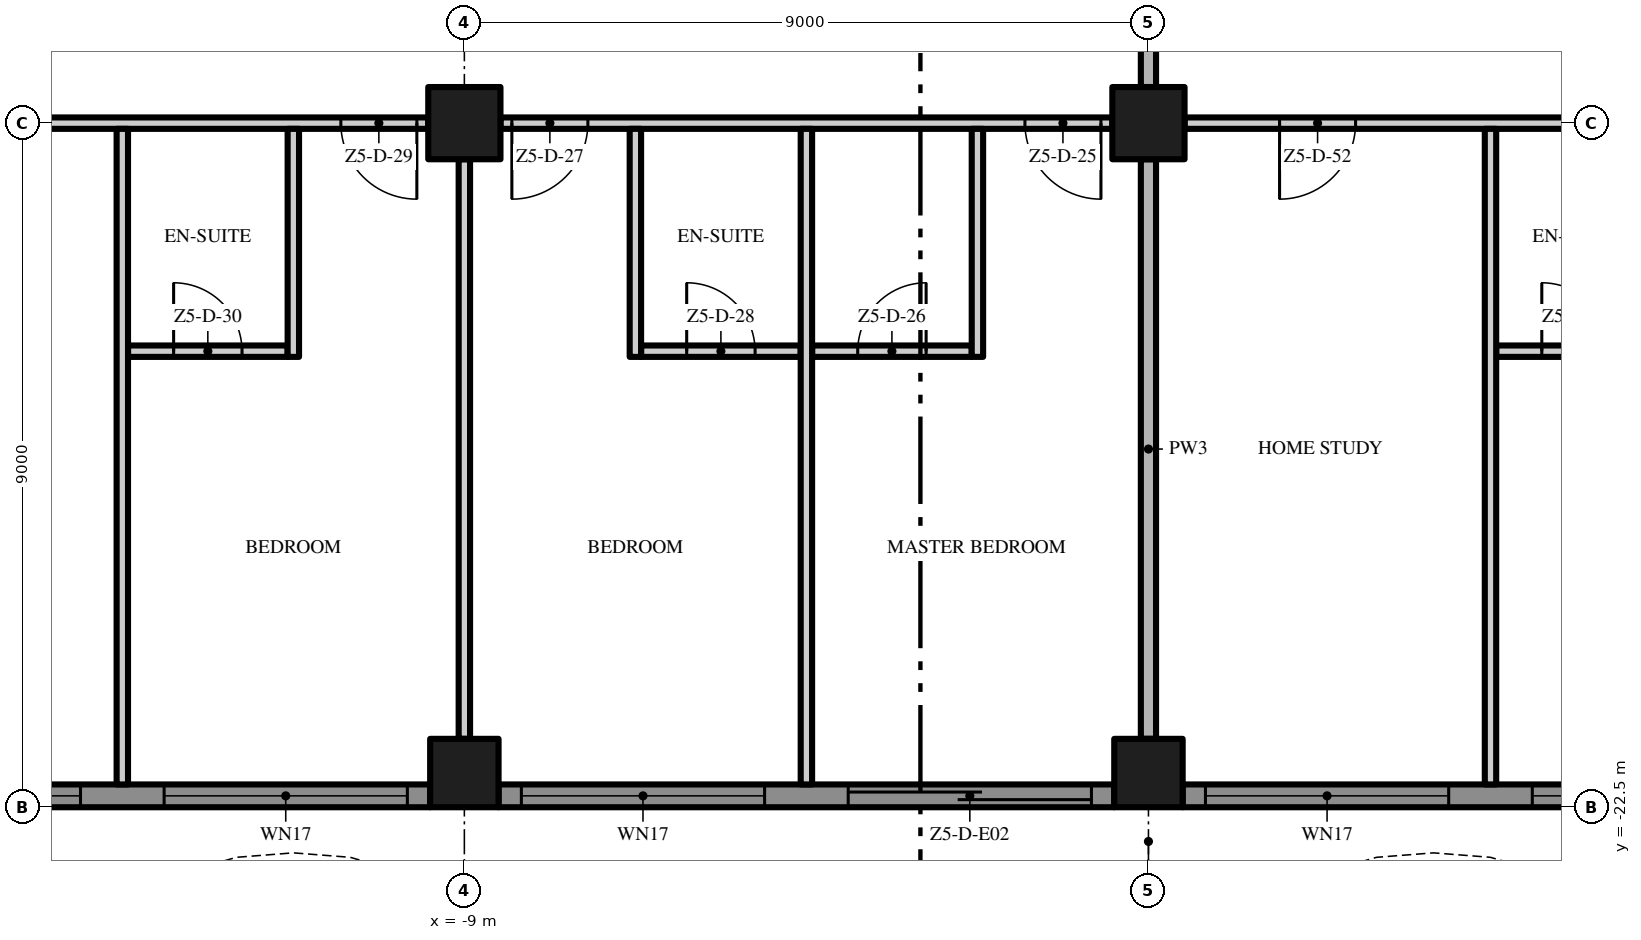
"""IFC4 building model, lengths in metres.
Left out: names, types, materials, properties, quantities, classifications, styles, units other than length and angle.
Written with IfcOpenShell. Run it as: python <this file> out.ifc"""

import sys

from ifc_helpers import new_model, si_unit, direction, frame, frame_2d, origin, origin_2d, place, context, subcontext, project, spatial, polyline, rectangle, outline, extrude, element, fill, save


model = new_model("IFC4")
c1 = context("Model", 3, precision=1e-05, world=origin(), true_north=direction((0.0, 1.0)))
c2 = subcontext(c1, "Body", "Model", "MODEL_VIEW")
j1 = project(units=[si_unit("LENGTHUNIT", "METRE"), si_unit("PLANEANGLEUNIT", "RADIAN")], contexts=[c1])
p1 = place(None, origin())
s1 = spatial("IfcSite", under=j1, at=p1, CompositionType="ELEMENT")
p2 = place(p1, origin())
s2 = spatial("IfcBuilding", under=s1, at=p2, CompositionType="ELEMENT")
p3 = place(p2, frame((0.0, 0.0, 273.0)))
s3 = spatial("IfcBuildingStorey", under=s2, at=p3, CompositionType="ELEMENT", Elevation=273.0)
p4 = place(p3, frame((-9.0, -13.5, 0.0), z_axis=(0.0, 0.0, 1.0), x_axis=(1.0, 0.0, 0.0)))
e1 = element("IfcColumn", 1, at=p4, inside=s3, PredefinedType="COLUMN", context=c2, shape_type="SweptSolid", body=[
    extrude(rectangle(XDim=0.95, YDim=0.95, at=origin_2d()), origin(), (0.0, 0.0, 1.0), 3.5),
])
p5 = place(p3, frame((-9.0, -22.05, 0.0), z_axis=(0.0, 0.0, 1.0), x_axis=(1.0, 0.0, 0.0)))
e2 = element("IfcColumn", 2, at=p5, inside=s3, PredefinedType="COLUMN", context=c2, shape_type="SweptSolid", body=[
    extrude(rectangle(XDim=0.9, YDim=0.9, at=origin_2d()), origin(), (0.0, 0.0, 1.0), 3.5),
])
p6 = place(p3, frame((0.0, -13.5, 0.0), z_axis=(0.0, 0.0, 1.0), x_axis=(1.0, 0.0, 0.0)))
e3 = element("IfcColumn", 3, at=p6, inside=s3, PredefinedType="COLUMN", context=c2, shape_type="SweptSolid", body=[
    extrude(rectangle(XDim=0.95, YDim=0.95, at=origin_2d()), origin(), (0.0, 0.0, 1.0), 3.5),
])
p7 = place(p3, frame((0.0, -22.05, 0.0), z_axis=(0.0, 0.0, 1.0), x_axis=(1.0, 0.0, 0.0)))
e4 = element("IfcColumn", 4, at=p7, inside=s3, PredefinedType="COLUMN", context=c2, shape_type="SweptSolid", body=[
    extrude(rectangle(XDim=0.9, YDim=0.9, at=origin_2d()), origin(), (0.0, 0.0, 1.0), 3.5),
])
p8 = place(p3, frame((-9.45, -22.35, 0.0), z_axis=(0.0, 0.0, 1.0), x_axis=(-1.0, 0.0, 0.0)))
e5 = element("IfcWall", 5, at=p8, inside=s3, PredefinedType="SOLIDWALL", context=c2, shape_type="SweptSolid", body=[
    extrude(rectangle(XDim=8.1, YDim=0.3, at=frame_2d((4.05, 0.0))), origin(), (0.0, 0.0, 1.0), 3.5),
])
p9 = place(p8, frame((4.6, 0.0, 0.45)))
e6 = element("IfcOpeningElement", 6, at=p9, cuts=e5, PredefinedType="OPENING", context=c2, shape_type="SweptSolid", body=[
    extrude(rectangle(XDim=3.2, YDim=2.65, at=frame_2d((1.6, 1.325))), frame((0.0, 0.16, 0.0), z_axis=(0.0, -1.0, 0.0), x_axis=(1.0, 0.0, 0.0)), (0.0, 0.0, 1.0), 0.32),
])
p10 = place(p8, frame((0.3, 0.0, 0.45)))
e7 = element("IfcOpeningElement", 7, at=p10, cuts=e5, PredefinedType="OPENING", context=c2, shape_type="SweptSolid", body=[
    extrude(rectangle(XDim=3.2, YDim=2.65, at=frame_2d((1.6, 1.325))), frame((0.0, 0.16, 0.0), z_axis=(0.0, -1.0, 0.0), x_axis=(1.0, 0.0, 0.0)), (0.0, 0.0, 1.0), 0.32),
])
p11 = place(p3, frame((-0.45, -22.35, 0.0), z_axis=(0.0, 0.0, 1.0), x_axis=(-1.0, 0.0, 0.0)))
e8 = element("IfcWall", 8, at=p11, inside=s3, PredefinedType="SOLIDWALL", context=c2, shape_type="SweptSolid", body=[
    extrude(rectangle(XDim=8.1, YDim=0.3, at=frame_2d((4.05, 0.0))), origin(), (0.0, 0.0, 1.0), 3.5),
])
p12 = place(p11, frame((4.6, 0.0, 0.45)))
e9 = element("IfcOpeningElement", 9, at=p12, cuts=e8, PredefinedType="OPENING", context=c2, shape_type="SweptSolid", body=[
    extrude(rectangle(XDim=3.2, YDim=2.65, at=frame_2d((1.6, 1.325))), frame((0.0, 0.16, 0.0), z_axis=(0.0, -1.0, 0.0), x_axis=(1.0, 0.0, 0.0)), (0.0, 0.0, 1.0), 0.32),
])
p13 = place(p11, frame((0.3, 0.0, 0.0)))
e10 = element("IfcOpeningElement", 10, at=p13, cuts=e8, PredefinedType="OPENING", context=c2, shape_type="SweptSolid", body=[
    extrude(rectangle(XDim=3.2, YDim=2.4, at=frame_2d((1.6, 1.2))), frame((0.0, 0.16, 0.0), z_axis=(0.0, -1.0, 0.0), x_axis=(1.0, 0.0, 0.0)), (0.0, 0.0, 1.0), 0.32),
])
p14 = place(p3, frame((8.55, -22.35, 0.0), z_axis=(0.0, 0.0, 1.0), x_axis=(-1.0, 0.0, 0.0)))
e11 = element("IfcWall", 11, at=p14, inside=s3, PredefinedType="SOLIDWALL", context=c2, shape_type="SweptSolid", body=[
    extrude(rectangle(XDim=8.1, YDim=0.3, at=frame_2d((4.05, 0.0))), origin(), (0.0, 0.0, 1.0), 3.5),
])
p15 = place(p14, frame((4.6, 0.0, 0.45)))
e12 = element("IfcOpeningElement", 12, at=p15, cuts=e11, PredefinedType="OPENING", context=c2, shape_type="SweptSolid", body=[
    extrude(rectangle(XDim=3.2, YDim=2.65, at=frame_2d((1.6, 1.325))), frame((0.0, 0.16, 0.0), z_axis=(0.0, -1.0, 0.0), x_axis=(1.0, 0.0, 0.0)), (0.0, 0.0, 1.0), 0.32),
])
p16 = place(p14, frame((0.3, 0.0, 0.45)))
e13 = element("IfcOpeningElement", 13, at=p16, cuts=e11, PredefinedType="OPENING", context=c2, shape_type="SweptSolid", body=[
    extrude(rectangle(XDim=3.2, YDim=2.65, at=frame_2d((1.6, 1.325))), frame((0.0, 0.16, 0.0), z_axis=(0.0, -1.0, 0.0), x_axis=(1.0, 0.0, 0.0)), (0.0, 0.0, 1.0), 0.32),
])
p17 = place(p3, origin())
e14 = element("IfcWall", 14, at=p17, inside=s3, PredefinedType="USERDEFINED", context=c2, shape_type="SweptSolid", body=[
    extrude(outline(polyline([(-22.5, -24.3), (-21.0, -25.005), (-19.5, -25.441), (-18.75, -25.5), (-18.0, -25.441), (-16.5, -25.005), (-15.0, -24.3), (-13.5, -23.595), (-12.0, -23.159), (-11.25, -23.1), (-10.5, -23.159), (-9.0, -23.595), (-7.5, -24.3), (-6.0, -25.005), (-4.5, -25.441), (-3.75, -25.5), (-3.0, -25.441), (-1.5, -25.005), (0.0, -24.3), (1.5, -23.595), (3.0, -23.159), (3.75, -23.1), (4.5, -23.159), (6.0, -23.595), (7.5, -24.3), (9.0, -25.005), (10.5, -25.441), (11.25, -25.5), (12.0, -25.441), (13.5, -25.005), (15.0, -24.3), (16.5, -23.595), (18.0, -23.159), (18.75, -23.1), (19.5, -23.159), (21.0, -23.595), (22.5, -24.3), (22.606, -24.074), (21.089, -23.36), (19.545, -22.911), (18.75, -22.849), (17.955, -22.911), (16.411, -23.36), (14.894, -24.074), (13.411, -24.771), (11.955, -25.194), (11.25, -25.249), (10.545, -25.194), (9.089, -24.771), (7.606, -24.074), (6.089, -23.36), (4.545, -22.911), (3.75, -22.849), (2.955, -22.911), (1.411, -23.36), (-0.106, -24.074), (-1.589, -24.771), (-3.045, -25.194), (-3.75, -25.249), (-4.455, -25.194), (-5.911, -24.771), (-7.394, -24.074), (-8.911, -23.36), (-10.455, -22.911), (-11.25, -22.849), (-12.045, -22.911), (-13.589, -23.36), (-15.106, -24.074), (-16.589, -24.771), (-18.045, -25.194), (-18.75, -25.249), (-19.455, -25.194), (-20.911, -24.771), (-22.394, -24.074), (-22.5, -24.3)])), origin(), (0.0, 0.0, 1.0), 0.9),
])
p18 = place(p3, frame((-13.425, -16.5, 0.0), z_axis=(0.0, 0.0, 1.0), x_axis=(1.0, 0.0, 0.0)))
e15 = element("IfcWall", 15, at=p18, inside=s3, PredefinedType="PARTITIONING", context=c2, shape_type="SweptSolid", body=[
    extrude(rectangle(XDim=2.1, YDim=0.15, at=frame_2d((1.05, 0.0))), origin(), (0.0, 0.0, 1.0), 3.5),
])
p19 = place(p18, frame((0.6, 0.0, 0.0)))
e16 = element("IfcOpeningElement", 16, at=p19, cuts=e15, PredefinedType="OPENING", context=c2, shape_type="SweptSolid", body=[
    extrude(rectangle(XDim=0.9, YDim=2.1, at=frame_2d((0.45, 1.05))), frame((0.0, 0.085, 0.0), z_axis=(0.0, -1.0, 0.0), x_axis=(1.0, 0.0, 0.0)), (0.0, 0.0, 1.0), 0.17),
])
p20 = place(p3, frame((-6.675, -16.5, 0.0), z_axis=(0.0, 0.0, 1.0), x_axis=(1.0, 0.0, 0.0)))
e17 = element("IfcWall", 17, at=p20, inside=s3, PredefinedType="PARTITIONING", context=c2, shape_type="SweptSolid", body=[
    extrude(rectangle(XDim=2.1, YDim=0.15, at=frame_2d((1.05, 0.0))), origin(), (0.0, 0.0, 1.0), 3.5),
])
p21 = place(p20, frame((0.6, 0.0, 0.0)))
e18 = element("IfcOpeningElement", 18, at=p21, cuts=e17, PredefinedType="OPENING", context=c2, shape_type="SweptSolid", body=[
    extrude(rectangle(XDim=0.9, YDim=2.1, at=frame_2d((0.45, 1.05))), frame((0.0, 0.085, 0.0), z_axis=(0.0, -1.0, 0.0), x_axis=(1.0, 0.0, 0.0)), (0.0, 0.0, 1.0), 0.17),
])
p22 = place(p3, frame((-4.425, -16.5, 0.0), z_axis=(0.0, 0.0, 1.0), x_axis=(1.0, 0.0, 0.0)))
e19 = element("IfcWall", 19, at=p22, inside=s3, PredefinedType="PARTITIONING", context=c2, shape_type="SweptSolid", body=[
    extrude(rectangle(XDim=2.1, YDim=0.15, at=frame_2d((1.05, 0.0))), origin(), (0.0, 0.0, 1.0), 3.5),
])
p23 = place(p22, frame((0.6, 0.0, 0.0)))
e20 = element("IfcOpeningElement", 20, at=p23, cuts=e19, PredefinedType="OPENING", context=c2, shape_type="SweptSolid", body=[
    extrude(rectangle(XDim=0.9, YDim=2.1, at=frame_2d((0.45, 1.05))), frame((0.0, 0.085, 0.0), z_axis=(0.0, -1.0, 0.0), x_axis=(1.0, 0.0, 0.0)), (0.0, 0.0, 1.0), 0.17),
])
p24 = place(p3, frame((4.575, -16.5, 0.0), z_axis=(0.0, 0.0, 1.0), x_axis=(1.0, 0.0, 0.0)))
e21 = element("IfcWall", 21, at=p24, inside=s3, PredefinedType="PARTITIONING", context=c2, shape_type="SweptSolid", body=[
    extrude(rectangle(XDim=2.1, YDim=0.15, at=frame_2d((1.05, 0.0))), origin(), (0.0, 0.0, 1.0), 3.5),
])
p25 = place(p24, frame((0.6, 0.0, 0.0)))
e22 = element("IfcOpeningElement", 22, at=p25, cuts=e21, PredefinedType="OPENING", context=c2, shape_type="SweptSolid", body=[
    extrude(rectangle(XDim=0.9, YDim=2.1, at=frame_2d((0.45, 1.05))), frame((0.0, 0.085, 0.0), z_axis=(0.0, -1.0, 0.0), x_axis=(1.0, 0.0, 0.0)), (0.0, 0.0, 1.0), 0.17),
])
p26 = place(p3, frame((-9.475, -13.5, 0.0), z_axis=(0.0, 0.0, 1.0), x_axis=(-1.0, 0.0, 0.0)))
e23 = element("IfcWall", 23, at=p26, inside=s3, PredefinedType="PARTITIONING", context=c2, shape_type="SweptSolid", body=[
    extrude(rectangle(XDim=8.05, YDim=0.15, at=frame_2d((4.025, 0.0))), origin(), (0.0, 0.0, 1.0), 3.5),
])
p27 = place(p26, frame((0.15, 0.0, 0.0)))
e24 = element("IfcOpeningElement", 24, at=p27, cuts=e23, PredefinedType="OPENING", context=c2, shape_type="SweptSolid", body=[
    extrude(rectangle(XDim=1.0, YDim=2.4, at=frame_2d((0.5, 1.2))), frame((0.0, 0.085, 0.0), z_axis=(0.0, -1.0, 0.0), x_axis=(1.0, 0.0, 0.0)), (0.0, 0.0, 1.0), 0.17),
])
p28 = place(p26, frame((5.8, 0.0, 0.0)))
e25 = element("IfcOpeningElement", 25, at=p28, cuts=e23, PredefinedType="OPENING", context=c2, shape_type="SweptSolid", body=[
    extrude(rectangle(XDim=1.0, YDim=2.4, at=frame_2d((0.5, 1.2))), frame((0.0, 0.085, 0.0), z_axis=(0.0, -1.0, 0.0), x_axis=(1.0, 0.0, 0.0)), (0.0, 0.0, 1.0), 0.17),
])
p29 = place(p3, frame((-0.475, -13.5, 0.0), z_axis=(0.0, 0.0, 1.0), x_axis=(-1.0, 0.0, 0.0)))
e26 = element("IfcWall", 26, at=p29, inside=s3, PredefinedType="PARTITIONING", context=c2, shape_type="SweptSolid", body=[
    extrude(rectangle(XDim=8.05, YDim=0.15, at=frame_2d((4.025, 0.0))), origin(), (0.0, 0.0, 1.0), 3.5),
])
p30 = place(p29, frame((0.15, 0.0, 0.0)))
e27 = element("IfcOpeningElement", 27, at=p30, cuts=e26, PredefinedType="OPENING", context=c2, shape_type="SweptSolid", body=[
    extrude(rectangle(XDim=1.0, YDim=2.4, at=frame_2d((0.5, 1.2))), frame((0.0, 0.085, 0.0), z_axis=(0.0, -1.0, 0.0), x_axis=(1.0, 0.0, 0.0)), (0.0, 0.0, 1.0), 0.17),
])
p31 = place(p29, frame((6.9, 0.0, 0.0)))
e28 = element("IfcOpeningElement", 28, at=p31, cuts=e26, PredefinedType="OPENING", context=c2, shape_type="SweptSolid", body=[
    extrude(rectangle(XDim=1.0, YDim=2.4, at=frame_2d((0.5, 1.2))), frame((0.0, 0.085, 0.0), z_axis=(0.0, -1.0, 0.0), x_axis=(1.0, 0.0, 0.0)), (0.0, 0.0, 1.0), 0.17),
])
p32 = place(p3, frame((8.525, -13.5, 0.0), z_axis=(0.0, 0.0, 1.0), x_axis=(-1.0, 0.0, 0.0)))
e29 = element("IfcWall", 29, at=p32, inside=s3, PredefinedType="PARTITIONING", context=c2, shape_type="SweptSolid", body=[
    extrude(rectangle(XDim=8.05, YDim=0.15, at=frame_2d((4.025, 0.0))), origin(), (0.0, 0.0, 1.0), 3.5),
])
p33 = place(p32, frame((0.15, 0.0, 0.0)))
e30 = element("IfcOpeningElement", 30, at=p33, cuts=e29, PredefinedType="OPENING", context=c2, shape_type="SweptSolid", body=[
    extrude(rectangle(XDim=1.0, YDim=2.4, at=frame_2d((0.5, 1.2))), frame((0.0, 0.085, 0.0), z_axis=(0.0, -1.0, 0.0), x_axis=(1.0, 0.0, 0.0)), (0.0, 0.0, 1.0), 0.17),
])
p34 = place(p32, frame((5.8, 0.0, 0.0)))
e31 = element("IfcOpeningElement", 31, at=p34, cuts=e29, PredefinedType="OPENING", context=c2, shape_type="SweptSolid", body=[
    extrude(rectangle(XDim=1.0, YDim=2.4, at=frame_2d((0.5, 1.2))), frame((0.0, 0.085, 0.0), z_axis=(0.0, -1.0, 0.0), x_axis=(1.0, 0.0, 0.0)), (0.0, 0.0, 1.0), 0.17),
])
p35 = place(p3, frame((-13.5, -22.2, 0.0), z_axis=(0.0, 0.0, 1.0), x_axis=(0.0, 1.0, 0.0)))
e32 = element("IfcWall", 32, at=p35, inside=s3, PredefinedType="PARTITIONING", context=c2, shape_type="SweptSolid", body=[
    extrude(rectangle(XDim=8.625, YDim=0.15, at=frame_2d((4.312, 0.0))), origin(), (0.0, 0.0, 1.0), 3.5),
])
p36 = place(p3, frame((-11.25, -16.575, 0.0), z_axis=(0.0, 0.0, 1.0), x_axis=(0.0, 1.0, 0.0)))
e33 = element("IfcWall", 33, at=p36, inside=s3, PredefinedType="PARTITIONING", context=c2, shape_type="SweptSolid", body=[
    extrude(rectangle(XDim=3.0, YDim=0.15, at=frame_2d((1.5, 0.0))), origin(), (0.0, 0.0, 1.0), 3.5),
])
p37 = place(p3, frame((-9.0, -21.6, 0.0), z_axis=(0.0, 0.0, 1.0), x_axis=(0.0, 1.0, 0.0)))
e34 = element("IfcWall", 34, at=p37, inside=s3, PredefinedType="PARTITIONING", context=c2, shape_type="SweptSolid", body=[
    extrude(rectangle(XDim=7.625, YDim=0.15, at=frame_2d((3.812, 0.0))), origin(), (0.0, 0.0, 1.0), 3.5),
])
p38 = place(p3, frame((-6.75, -16.575, 0.0), z_axis=(0.0, 0.0, 1.0), x_axis=(0.0, 1.0, 0.0)))
e35 = element("IfcWall", 35, at=p38, inside=s3, PredefinedType="PARTITIONING", context=c2, shape_type="SweptSolid", body=[
    extrude(rectangle(XDim=3.0, YDim=0.15, at=frame_2d((1.5, 0.0))), origin(), (0.0, 0.0, 1.0), 3.5),
])
p39 = place(p3, frame((-4.5, -22.2, 0.0), z_axis=(0.0, 0.0, 1.0), x_axis=(0.0, 1.0, 0.0)))
e36 = element("IfcWall", 36, at=p39, inside=s3, PredefinedType="PARTITIONING", context=c2, shape_type="SweptSolid", body=[
    extrude(rectangle(XDim=8.625, YDim=0.15, at=frame_2d((4.312, 0.0))), origin(), (0.0, 0.0, 1.0), 3.5),
])
p40 = place(p3, frame((-2.25, -16.575, 0.0), z_axis=(0.0, 0.0, 1.0), x_axis=(0.0, 1.0, 0.0)))
e37 = element("IfcWall", 37, at=p40, inside=s3, PredefinedType="PARTITIONING", context=c2, shape_type="SweptSolid", body=[
    extrude(rectangle(XDim=3.0, YDim=0.15, at=frame_2d((1.5, 0.0))), origin(), (0.0, 0.0, 1.0), 3.5),
])
p41 = place(p3, frame((0.0, -21.6, 0.0), z_axis=(0.0, 0.0, 1.0), x_axis=(0.0, 1.0, 0.0)))
e38 = element("IfcWall", 38, at=p41, inside=s3, PredefinedType="PARTITIONING", context=c2, shape_type="SweptSolid", body=[
    extrude(rectangle(XDim=7.625, YDim=0.2, at=frame_2d((3.812, 0.0))), origin(), (0.0, 0.0, 1.0), 3.5),
])
p42 = place(p3, frame((0.0, -13.025, 0.0), z_axis=(0.0, 0.0, 1.0), x_axis=(0.0, 1.0, 0.0)))
e39 = element("IfcWall", 39, at=p42, inside=s3, PredefinedType="PARTITIONING", context=c2, shape_type="SweptSolid", body=[
    extrude(rectangle(XDim=8.05, YDim=0.2, at=frame_2d((4.025, 0.0))), origin(), (0.0, 0.0, 1.0), 3.5),
])
p43 = place(p3, frame((4.5, -22.2, 0.0), z_axis=(0.0, 0.0, 1.0), x_axis=(0.0, 1.0, 0.0)))
e40 = element("IfcWall", 40, at=p43, inside=s3, PredefinedType="PARTITIONING", context=c2, shape_type="SweptSolid", body=[
    extrude(rectangle(XDim=8.625, YDim=0.15, at=frame_2d((4.312, 0.0))), origin(), (0.0, 0.0, 1.0), 3.5),
])
p44 = place(p9, origin())
e41 = element("IfcWindow", 41, at=p44, inside=s3, PartitioningType="SINGLE_PANEL", PredefinedType="WINDOW", context=c2, shape_type="SweptSolid", body=[
    extrude(rectangle(XDim=3.2, YDim=2.65, at=frame_2d((1.6, 1.325))), frame((0.0, 0.03, 0.0), z_axis=(0.0, -1.0, 0.0), x_axis=(1.0, 0.0, 0.0)), (0.0, 0.0, 1.0), 0.06),
])
fill(e6, e41)
p45 = place(p10, origin())
e42 = element("IfcWindow", 42, at=p45, inside=s3, PartitioningType="SINGLE_PANEL", PredefinedType="WINDOW", context=c2, shape_type="SweptSolid", body=[
    extrude(rectangle(XDim=3.2, YDim=2.65, at=frame_2d((1.6, 1.325))), frame((0.0, 0.03, 0.0), z_axis=(0.0, -1.0, 0.0), x_axis=(1.0, 0.0, 0.0)), (0.0, 0.0, 1.0), 0.06),
])
fill(e7, e42)
p46 = place(p12, origin())
e43 = element("IfcWindow", 43, at=p46, inside=s3, PartitioningType="SINGLE_PANEL", PredefinedType="WINDOW", context=c2, shape_type="SweptSolid", body=[
    extrude(rectangle(XDim=3.2, YDim=2.65, at=frame_2d((1.6, 1.325))), frame((0.0, 0.03, 0.0), z_axis=(0.0, -1.0, 0.0), x_axis=(1.0, 0.0, 0.0)), (0.0, 0.0, 1.0), 0.06),
])
fill(e9, e43)
p47 = place(p13, origin())
e44 = element("IfcDoor", 44, at=p47, inside=s3, OperationType="SINGLE_SWING_LEFT", PredefinedType="DOOR", context=c2, shape_type="SweptSolid", body=[
    extrude(rectangle(XDim=3.2, YDim=2.4, at=frame_2d((1.6, 1.2))), frame((0.0, 0.025, 0.0), z_axis=(0.0, -1.0, 0.0), x_axis=(1.0, 0.0, 0.0)), (0.0, 0.0, 1.0), 0.05),
])
fill(e10, e44)
p48 = place(p15, origin())
e45 = element("IfcWindow", 45, at=p48, inside=s3, PartitioningType="SINGLE_PANEL", PredefinedType="WINDOW", context=c2, shape_type="SweptSolid", body=[
    extrude(rectangle(XDim=3.2, YDim=2.65, at=frame_2d((1.6, 1.325))), frame((0.0, 0.03, 0.0), z_axis=(0.0, -1.0, 0.0), x_axis=(1.0, 0.0, 0.0)), (0.0, 0.0, 1.0), 0.06),
])
fill(e12, e45)
p49 = place(p16, origin())
e46 = element("IfcWindow", 46, at=p49, inside=s3, PartitioningType="SINGLE_PANEL", PredefinedType="WINDOW", context=c2, shape_type="SweptSolid", body=[
    extrude(rectangle(XDim=3.2, YDim=2.65, at=frame_2d((1.6, 1.325))), frame((0.0, 0.03, 0.0), z_axis=(0.0, -1.0, 0.0), x_axis=(1.0, 0.0, 0.0)), (0.0, 0.0, 1.0), 0.06),
])
fill(e13, e46)
p50 = place(p30, origin())
e47 = element("IfcDoor", 47, at=p50, inside=s3, OperationType="SINGLE_SWING_LEFT", PredefinedType="DOOR", context=c2, shape_type="SweptSolid", body=[
    extrude(rectangle(XDim=1.0, YDim=2.4, at=frame_2d((0.5, 1.2))), frame((0.0, 0.025, 0.0), z_axis=(0.0, -1.0, 0.0), x_axis=(1.0, 0.0, 0.0)), (0.0, 0.0, 1.0), 0.05),
])
fill(e27, e47)
p51 = place(p23, origin())
e48 = element("IfcDoor", 48, at=p51, inside=s3, OperationType="SINGLE_SWING_RIGHT", PredefinedType="DOOR", context=c2, shape_type="SweptSolid", body=[
    extrude(rectangle(XDim=0.9, YDim=2.1, at=frame_2d((0.45, 1.05))), frame((0.0, 0.025, 0.0), z_axis=(0.0, -1.0, 0.0), x_axis=(1.0, 0.0, 0.0)), (0.0, 0.0, 1.0), 0.05),
])
fill(e20, e48)
p52 = place(p31, origin())
e49 = element("IfcDoor", 49, at=p52, inside=s3, OperationType="SINGLE_SWING_RIGHT", PredefinedType="DOOR", context=c2, shape_type="SweptSolid", body=[
    extrude(rectangle(XDim=1.0, YDim=2.4, at=frame_2d((0.5, 1.2))), frame((0.0, 0.025, 0.0), z_axis=(0.0, -1.0, 0.0), x_axis=(1.0, 0.0, 0.0)), (0.0, 0.0, 1.0), 0.05),
])
fill(e28, e49)
p53 = place(p21, origin())
e50 = element("IfcDoor", 50, at=p53, inside=s3, OperationType="SINGLE_SWING_LEFT", PredefinedType="DOOR", context=c2, shape_type="SweptSolid", body=[
    extrude(rectangle(XDim=0.9, YDim=2.1, at=frame_2d((0.45, 1.05))), frame((0.0, 0.025, 0.0), z_axis=(0.0, -1.0, 0.0), x_axis=(1.0, 0.0, 0.0)), (0.0, 0.0, 1.0), 0.05),
])
fill(e18, e50)
p54 = place(p27, origin())
e51 = element("IfcDoor", 51, at=p54, inside=s3, OperationType="SINGLE_SWING_LEFT", PredefinedType="DOOR", context=c2, shape_type="SweptSolid", body=[
    extrude(rectangle(XDim=1.0, YDim=2.4, at=frame_2d((0.5, 1.2))), frame((0.0, 0.025, 0.0), z_axis=(0.0, -1.0, 0.0), x_axis=(1.0, 0.0, 0.0)), (0.0, 0.0, 1.0), 0.05),
])
fill(e24, e51)
p55 = place(p19, origin())
e52 = element("IfcDoor", 52, at=p55, inside=s3, OperationType="SINGLE_SWING_LEFT", PredefinedType="DOOR", context=c2, shape_type="SweptSolid", body=[
    extrude(rectangle(XDim=0.9, YDim=2.1, at=frame_2d((0.45, 1.05))), frame((0.0, 0.025, 0.0), z_axis=(0.0, -1.0, 0.0), x_axis=(1.0, 0.0, 0.0)), (0.0, 0.0, 1.0), 0.05),
])
fill(e16, e52)
p56 = place(p25, origin())
e53 = element("IfcDoor", 53, at=p56, inside=s3, OperationType="SINGLE_SWING_LEFT", PredefinedType="DOOR", context=c2, shape_type="SweptSolid", body=[
    extrude(rectangle(XDim=0.9, YDim=2.1, at=frame_2d((0.45, 1.05))), frame((0.0, 0.025, 0.0), z_axis=(0.0, -1.0, 0.0), x_axis=(1.0, 0.0, 0.0)), (0.0, 0.0, 1.0), 0.05),
])
fill(e22, e53)
p57 = place(p34, origin())
e54 = element("IfcDoor", 54, at=p57, inside=s3, OperationType="SINGLE_SWING_RIGHT", PredefinedType="DOOR", context=c2, shape_type="SweptSolid", body=[
    extrude(rectangle(XDim=1.0, YDim=2.4, at=frame_2d((0.5, 1.2))), frame((0.0, 0.025, 0.0), z_axis=(0.0, -1.0, 0.0), x_axis=(1.0, 0.0, 0.0)), (0.0, 0.0, 1.0), 0.05),
])
fill(e31, e54)
save(model, sys.argv[1])
